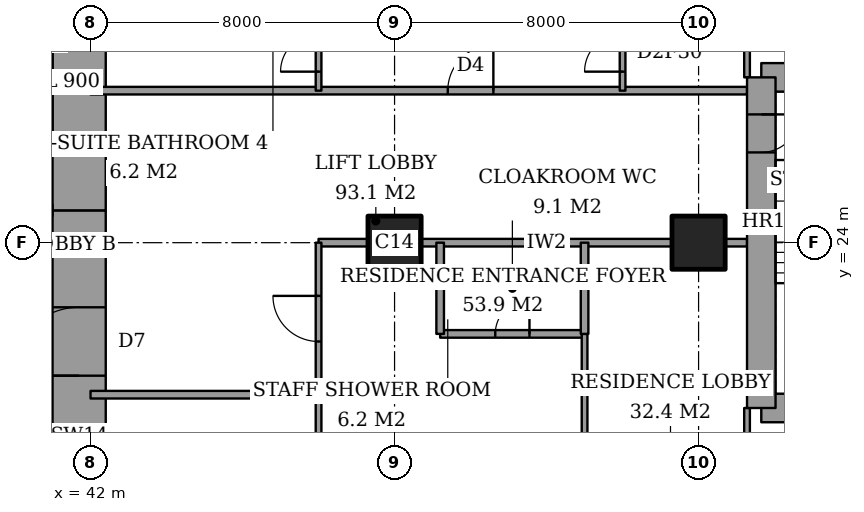
"""IFC4 building model, lengths in metres.
Left out: names, types, materials, properties, quantities, classifications, styles, units other than length and angle.
Written with IfcOpenShell. Run it as: python <this file> out.ifc"""

import sys

from ifc_helpers import new_model, si_unit, direction, frame, frame_2d, origin, origin_2d, place, context, subcontext, project, spatial, rectangle, extrude, element, fill, save


model = new_model("IFC4")
c1 = context("Model", 3, precision=1e-05, world=origin(), true_north=direction((0.0, 1.0)))
c2 = subcontext(c1, "Body", "Model", "MODEL_VIEW")
j1 = project(units=[si_unit("LENGTHUNIT", "METRE"), si_unit("PLANEANGLEUNIT", "RADIAN")], contexts=[c1])
p1 = place(None, origin())
s1 = spatial("IfcSite", under=j1, at=p1, CompositionType="ELEMENT")
p2 = place(p1, origin())
s2 = spatial("IfcBuilding", under=s1, at=p2, CompositionType="ELEMENT")
p3 = place(p2, frame((0.0, 0.0, 282.6)))
s3 = spatial("IfcBuildingStorey", under=s2, at=p3, CompositionType="ELEMENT", Elevation=282.6)
for number, where, z_axis, x_axis in (
    (1, (50.0, 24.0, 0.0), (0.0, 0.0, 1.0), (1.0, 0.0, 0.0)),
    (2, (58.0, 24.0, 0.0), (0.0, 0.0, 1.0), (1.0, 0.0, 0.0)),
):
    element("IfcColumn", number, at=place(p3, frame(where, z_axis=z_axis, x_axis=x_axis)), inside=s3, PredefinedType="COLUMN", context=c2, shape_type="SweptSolid", body=[
        extrude(rectangle(XDim=1.4, YDim=1.4, at=origin_2d()), origin(), (0.0, 0.0, 1.0), 4.5),
    ])
p4 = place(p3, frame((41.7, 13.0, 0.0), z_axis=(0.0, 0.0, 1.0), x_axis=(0.0, 1.0, 0.0)))
e3 = element("IfcWall", 3, at=p4, inside=s3, PredefinedType="SHEAR", context=c2, shape_type="SweptSolid", body=[
    extrude(rectangle(XDim=11.85, YDim=1.4, at=frame_2d((5.925, 0.0))), origin(), (0.0, 0.0, 1.0), 4.5),
])
p5 = place(p4, frame((7.5, 0.0, 0.0)))
e4 = element("IfcOpeningElement", 4, at=p5, cuts=e3, PredefinedType="OPENING", context=c2, shape_type="SweptSolid", body=[
    extrude(rectangle(XDim=1.8, YDim=2.4, at=frame_2d((0.9, 1.2))), frame((0.0, 0.71, 0.0), z_axis=(0.0, -1.0, 0.0), x_axis=(1.0, 0.0, 0.0)), (0.0, 0.0, 1.0), 1.42),
])
p6 = place(p3, frame((41.7, 24.85, 0.0), z_axis=(0.0, 0.0, 1.0), x_axis=(0.0, 1.0, 0.0)))
e5 = element("IfcWall", 5, at=p6, inside=s3, PredefinedType="SHEAR", context=c2, shape_type="SweptSolid", body=[
    extrude(rectangle(XDim=10.15, YDim=1.4, at=frame_2d((5.075, 0.0))), origin(), (0.0, 0.0, 1.0), 4.5),
])
for number, where, z_axis, x_axis in (
    (6, (59.65, 19.65, 0.0), (0.0, 0.0, 1.0), (1.0, 0.0, 0.0)),
    (7, (64.1, 28.35, 0.0), (0.0, 0.0, 1.0), (-1.0, 0.0, 0.0)),
):
    element("IfcWall", number, at=place(p3, frame(where, z_axis=z_axis, x_axis=x_axis)), inside=s3, PredefinedType="SHEAR", context=c2, shape_type="SweptSolid", body=[
        extrude(rectangle(XDim=4.45, YDim=0.75, at=frame_2d((2.225, 0.0))), origin(), (0.0, 0.0, 1.0), 4.5),
    ])
p7 = place(p3, frame((59.65, 28.35, 0.0), z_axis=(0.0, 0.0, 1.0), x_axis=(0.0, -1.0, 0.0)))
e8 = element("IfcWall", 8, at=p7, inside=s3, PredefinedType="SHEAR", context=c2, shape_type="SweptSolid", body=[
    extrude(rectangle(XDim=8.7, YDim=0.75, at=frame_2d((4.35, 0.0))), origin(), (0.0, 0.0, 1.0), 4.5),
])
p8 = place(p7, frame((0.975, 0.0, 0.0)))
e9 = element("IfcOpeningElement", 9, at=p8, cuts=e8, PredefinedType="OPENING", context=c2, shape_type="SweptSolid", body=[
    extrude(rectangle(XDim=1.0, YDim=2.1, at=frame_2d((0.5, 1.05))), frame((0.0, 0.385, 0.0), z_axis=(0.0, -1.0, 0.0), x_axis=(1.0, 0.0, 0.0)), (0.0, 0.0, 1.0), 0.77),
])
p9 = place(p3, frame((42.0, 20.0, 0.0), z_axis=(0.0, 0.0, 1.0), x_axis=(1.0, 0.0, 0.0)))
e10 = element("IfcWall", 10, at=p9, inside=s3, PredefinedType="PARTITIONING", context=c2, shape_type="SweptSolid", body=[
    extrude(rectangle(XDim=6.0, YDim=0.2, at=frame_2d((3.0, 0.0))), origin(), (0.0, 0.0, 1.0), 4.25),
])
p10 = place(p3, frame((51.2, 21.6, 0.0), z_axis=(0.0, 0.0, 1.0), x_axis=(1.0, 0.0, 0.0)))
e11 = element("IfcWall", 11, at=p10, inside=s3, PredefinedType="PARTITIONING", context=c2, shape_type="SweptSolid", body=[
    extrude(rectangle(XDim=3.8, YDim=0.2, at=frame_2d((1.9, 0.0))), origin(), (0.0, 0.0, 1.0), 4.25),
])
p11 = place(p10, frame((1.45, 0.0, 0.0)))
e12 = element("IfcOpeningElement", 12, at=p11, cuts=e11, PredefinedType="OPENING", context=c2, shape_type="SweptSolid", body=[
    extrude(rectangle(XDim=0.9, YDim=2.1, at=frame_2d((0.45, 1.05))), frame((0.0, 0.11, 0.0), z_axis=(0.0, -1.0, 0.0), x_axis=(1.0, 0.0, 0.0)), (0.0, 0.0, 1.0), 0.22),
])
p12 = place(p3, frame((48.0, 24.0, 0.0), z_axis=(0.0, 0.0, 1.0), x_axis=(1.0, 0.0, 0.0)))
e13 = element("IfcWall", 13, at=p12, inside=s3, PredefinedType="PARTITIONING", context=c2, shape_type="SweptSolid", body=[
    extrude(rectangle(XDim=1.3, YDim=0.2, at=frame_2d((0.65, 0.0))), origin(), (0.0, 0.0, 1.0), 4.25),
])
p13 = place(p3, frame((50.7, 24.0, 0.0), z_axis=(0.0, 0.0, 1.0), x_axis=(1.0, 0.0, 0.0)))
e14 = element("IfcWall", 14, at=p13, inside=s3, PredefinedType="PARTITIONING", context=c2, shape_type="SweptSolid", body=[
    extrude(rectangle(XDim=6.6, YDim=0.2, at=frame_2d((3.3, 0.0))), origin(), (0.0, 0.0, 1.0), 4.25),
])
p14 = place(p3, frame((58.7, 24.0, 0.0), z_axis=(0.0, 0.0, 1.0), x_axis=(1.0, 0.0, 0.0)))
e15 = element("IfcWall", 15, at=p14, inside=s3, PredefinedType="PARTITIONING", context=c2, shape_type="SweptSolid", body=[
    extrude(rectangle(XDim=0.575, YDim=0.2, at=frame_2d((0.288, 0.0))), origin(), (0.0, 0.0, 1.0), 4.25),
])
p15 = place(p3, frame((42.0, 28.0, 0.0), z_axis=(0.0, 0.0, 1.0), x_axis=(1.0, 0.0, 0.0)))
e16 = element("IfcWall", 16, at=p15, inside=s3, PredefinedType="PARTITIONING", context=c2, shape_type="SweptSolid", body=[
    extrude(rectangle(XDim=17.275, YDim=0.2, at=frame_2d((8.637, 0.0))), origin(), (0.0, 0.0, 1.0), 4.25),
])
p16 = place(p15, frame((9.4, 0.0, 0.0)))
e17 = element("IfcOpeningElement", 17, at=p16, cuts=e16, PredefinedType="OPENING", context=c2, shape_type="SweptSolid", body=[
    extrude(rectangle(XDim=1.2, YDim=2.4, at=frame_2d((0.6, 1.2))), frame((0.0, 0.11, 0.0), z_axis=(0.0, -1.0, 0.0), x_axis=(1.0, 0.0, 0.0)), (0.0, 0.0, 1.0), 0.22),
])
p17 = place(p3, frame((48.0, 11.0, 0.0), z_axis=(0.0, 0.0, 1.0), x_axis=(0.0, 1.0, 0.0)))
e18 = element("IfcWall", 18, at=p17, inside=s3, PredefinedType="PARTITIONING", context=c2, shape_type="SweptSolid", body=[
    extrude(rectangle(XDim=13.0, YDim=0.15, at=frame_2d((6.5, 0.0))), origin(), (0.0, 0.0, 1.0), 4.25),
])
p18 = place(p17, frame((10.4, 0.0, 0.0)))
e19 = element("IfcOpeningElement", 19, at=p18, cuts=e18, PredefinedType="OPENING", context=c2, shape_type="SweptSolid", body=[
    extrude(rectangle(XDim=1.2, YDim=2.4, at=frame_2d((0.6, 1.2))), frame((0.0, 0.085, 0.0), z_axis=(0.0, -1.0, 0.0), x_axis=(1.0, 0.0, 0.0)), (0.0, 0.0, 1.0), 0.17),
])
p19 = place(p17, frame((6.8, 0.0, 0.0)))
e20 = element("IfcOpeningElement", 20, at=p19, cuts=e18, PredefinedType="OPENING", context=c2, shape_type="SweptSolid", body=[
    extrude(rectangle(XDim=0.9, YDim=2.1, at=frame_2d((0.45, 1.05))), frame((0.0, 0.085, 0.0), z_axis=(0.0, -1.0, 0.0), x_axis=(1.0, 0.0, 0.0)), (0.0, 0.0, 1.0), 0.17),
])
p20 = place(p3, frame((48.0, 28.0, 0.0), z_axis=(0.0, 0.0, 1.0), x_axis=(0.0, 1.0, 0.0)))
e21 = element("IfcWall", 21, at=p20, inside=s3, PredefinedType="PARTITIONING", context=c2, shape_type="SweptSolid", body=[
    extrude(rectangle(XDim=9.2, YDim=0.15, at=frame_2d((4.6, 0.0))), origin(), (0.0, 0.0, 1.0), 4.25),
])
p21 = place(p20, frame((0.5, 0.0, 0.0)))
e22 = element("IfcOpeningElement", 22, at=p21, cuts=e21, PredefinedType="OPENING", context=c2, shape_type="SweptSolid", body=[
    extrude(rectangle(XDim=1.0, YDim=2.1, at=frame_2d((0.5, 1.05))), frame((0.0, 0.085, 0.0), z_axis=(0.0, -1.0, 0.0), x_axis=(1.0, 0.0, 0.0)), (0.0, 0.0, 1.0), 0.17),
])
for number, where, z_axis, x_axis in (
    (23, (51.2, 21.6, 0.0), (0.0, 0.0, 1.0), (0.0, 1.0, 0.0)),
    (24, (55.0, 21.6, 0.0), (0.0, 0.0, 1.0), (0.0, 1.0, 0.0)),
):
    element("IfcWall", number, at=place(p3, frame(where, z_axis=z_axis, x_axis=x_axis)), inside=s3, PredefinedType="PARTITIONING", context=c2, shape_type="SweptSolid", body=[
        extrude(rectangle(XDim=2.4, YDim=0.2, at=frame_2d((1.2, 0.0))), origin(), (0.0, 0.0, 1.0), 4.25),
    ])
p22 = place(p3, frame((55.0, 11.0, 0.0), z_axis=(0.0, 0.0, 1.0), x_axis=(0.0, 1.0, 0.0)))
e25 = element("IfcWall", 25, at=p22, inside=s3, PredefinedType="PARTITIONING", context=c2, shape_type="SweptSolid", body=[
    extrude(rectangle(XDim=10.6, YDim=0.15, at=frame_2d((5.3, 0.0))), origin(), (0.0, 0.0, 1.0), 4.25),
])
p23 = place(p22, frame((6.8, 0.0, 0.0)))
e26 = element("IfcOpeningElement", 26, at=p23, cuts=e25, PredefinedType="OPENING", context=c2, shape_type="SweptSolid", body=[
    extrude(rectangle(XDim=1.0, YDim=2.1, at=frame_2d((0.5, 1.05))), frame((0.0, 0.085, 0.0), z_axis=(0.0, -1.0, 0.0), x_axis=(1.0, 0.0, 0.0)), (0.0, 0.0, 1.0), 0.17),
])
p24 = place(p3, frame((56.0, 28.0, 0.0), z_axis=(0.0, 0.0, 1.0), x_axis=(0.0, 1.0, 0.0)))
e27 = element("IfcWall", 27, at=p24, inside=s3, PredefinedType="PARTITIONING", context=c2, shape_type="SweptSolid", body=[
    extrude(rectangle(XDim=9.2, YDim=0.15, at=frame_2d((4.6, 0.0))), origin(), (0.0, 0.0, 1.0), 4.25),
])
p25 = place(p24, frame((0.5, 0.0, 0.0)))
e28 = element("IfcOpeningElement", 28, at=p25, cuts=e27, PredefinedType="OPENING", context=c2, shape_type="SweptSolid", body=[
    extrude(rectangle(XDim=1.0, YDim=2.1, at=frame_2d((0.5, 1.05))), frame((0.0, 0.085, 0.0), z_axis=(0.0, -1.0, 0.0), x_axis=(1.0, 0.0, 0.0)), (0.0, 0.0, 1.0), 0.17),
])
p26 = place(p3, frame((59.275, 17.2, 0.0), z_axis=(0.0, 0.0, 1.0), x_axis=(0.0, 1.0, 0.0)))
e29 = element("IfcWall", 29, at=p26, inside=s3, PredefinedType="PARTITIONING", context=c2, shape_type="SweptSolid", body=[
    extrude(rectangle(XDim=2.45, YDim=0.15, at=frame_2d((1.225, 0.0))), origin(), (0.0, 0.0, 1.0), 4.25),
])
p27 = place(p26, frame((0.538, 0.0, 0.0)))
e30 = element("IfcOpeningElement", 30, at=p27, cuts=e29, PredefinedType="OPENING", context=c2, shape_type="SweptSolid", body=[
    extrude(rectangle(XDim=1.0, YDim=2.1, at=frame_2d((0.5, 1.05))), frame((0.0, 0.085, 0.0), z_axis=(0.0, -1.0, 0.0), x_axis=(1.0, 0.0, 0.0)), (0.0, 0.0, 1.0), 0.17),
])
p28 = place(p3, frame((59.275, 28.35, 0.0), z_axis=(0.0, 0.0, 1.0), x_axis=(0.0, 1.0, 0.0)))
e31 = element("IfcWall", 31, at=p28, inside=s3, PredefinedType="PARTITIONING", context=c2, shape_type="SweptSolid", body=[
    extrude(rectangle(XDim=2.45, YDim=0.15, at=frame_2d((1.225, 0.0))), origin(), (0.0, 0.0, 1.0), 4.25),
])
p29 = place(p28, frame((0.913, 0.0, 0.0)))
e32 = element("IfcOpeningElement", 32, at=p29, cuts=e31, PredefinedType="OPENING", context=c2, shape_type="SweptSolid", body=[
    extrude(rectangle(XDim=1.0, YDim=2.1, at=frame_2d((0.5, 1.05))), frame((0.0, 0.085, 0.0), z_axis=(0.0, -1.0, 0.0), x_axis=(1.0, 0.0, 0.0)), (0.0, 0.0, 1.0), 0.17),
])
p30 = place(p11, origin())
e33 = element("IfcDoor", 33, at=p30, inside=s3, OperationType="SINGLE_SWING_LEFT", PredefinedType="DOOR", context=c2, shape_type="SweptSolid", body=[
    extrude(rectangle(XDim=0.9, YDim=2.1, at=frame_2d((0.45, 1.05))), frame((0.0, 0.025, 0.0), z_axis=(0.0, -1.0, 0.0), x_axis=(1.0, 0.0, 0.0)), (0.0, 0.0, 1.0), 0.05),
])
fill(e12, e33)
p31 = place(p18, origin())
e34 = element("IfcDoor", 34, at=p31, inside=s3, OperationType="SINGLE_SWING_LEFT", PredefinedType="DOOR", context=c2, shape_type="SweptSolid", body=[
    extrude(rectangle(XDim=1.2, YDim=2.4, at=frame_2d((0.6, 1.2))), frame((0.0, 0.025, 0.0), z_axis=(0.0, -1.0, 0.0), x_axis=(1.0, 0.0, 0.0)), (0.0, 0.0, 1.0), 0.05),
])
fill(e19, e34)
p32 = place(p25, origin())
e35 = element("IfcDoor", 35, at=p32, inside=s3, OperationType="SINGLE_SWING_RIGHT", PredefinedType="DOOR", context=c2, shape_type="SweptSolid", body=[
    extrude(rectangle(XDim=1.0, YDim=2.1, at=frame_2d((0.5, 1.05))), frame((0.0, 0.025, 0.0), z_axis=(0.0, -1.0, 0.0), x_axis=(1.0, 0.0, 0.0)), (0.0, 0.0, 1.0), 0.05),
])
fill(e28, e35)
p33 = place(p16, origin())
e36 = element("IfcDoor", 36, at=p33, inside=s3, OperationType="SINGLE_SWING_LEFT", PredefinedType="DOOR", context=c2, shape_type="SweptSolid", body=[
    extrude(rectangle(XDim=1.2, YDim=2.4, at=frame_2d((0.6, 1.2))), frame((0.0, 0.025, 0.0), z_axis=(0.0, -1.0, 0.0), x_axis=(1.0, 0.0, 0.0)), (0.0, 0.0, 1.0), 0.05),
])
fill(e17, e36)
p34 = place(p21, origin())
e37 = element("IfcDoor", 37, at=p34, inside=s3, OperationType="SINGLE_SWING_RIGHT", PredefinedType="DOOR", context=c2, shape_type="SweptSolid", body=[
    extrude(rectangle(XDim=1.0, YDim=2.1, at=frame_2d((0.5, 1.05))), frame((0.0, 0.025, 0.0), z_axis=(0.0, -1.0, 0.0), x_axis=(1.0, 0.0, 0.0)), (0.0, 0.0, 1.0), 0.05),
])
fill(e22, e37)
p35 = place(p5, origin())
e38 = element("IfcDoor", 38, at=p35, inside=s3, OperationType="DOUBLE_DOOR_DOUBLE_SWING", PredefinedType="DOOR", context=c2, shape_type="SweptSolid", body=[
    extrude(rectangle(XDim=1.8, YDim=2.4, at=frame_2d((0.9, 1.2))), frame((0.0, 0.025, 0.0), z_axis=(0.0, -1.0, 0.0), x_axis=(1.0, 0.0, 0.0)), (0.0, 0.0, 1.0), 0.05),
])
fill(e4, e38)
p36 = place(p8, origin())
e39 = element("IfcDoor", 39, at=p36, inside=s3, OperationType="SINGLE_SWING_RIGHT", PredefinedType="DOOR", context=c2, shape_type="SweptSolid", body=[
    extrude(rectangle(XDim=1.0, YDim=2.1, at=frame_2d((0.5, 1.05))), frame((0.0, 0.025, 0.0), z_axis=(0.0, -1.0, 0.0), x_axis=(1.0, 0.0, 0.0)), (0.0, 0.0, 1.0), 0.05),
])
fill(e9, e39)
save(model, sys.argv[1])
